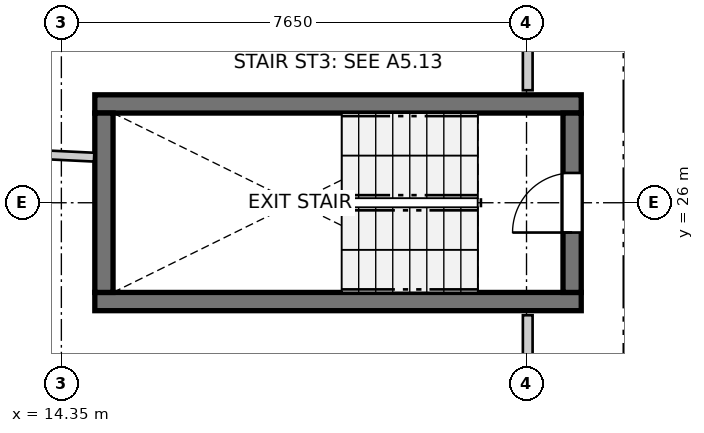
"""IFC4 building model, lengths in metres.
Left out: names, types, materials, properties, quantities, classifications, styles, units other than length and angle.
Written with IfcOpenShell. Run it as: python <this file> out.ifc"""

import sys

from ifc_helpers import new_model, si_unit, direction, frame, frame_2d, origin, place, context, subcontext, project, spatial, rectangle, extrude, source, transform, mapped, element, fill, save


model = new_model("IFC4")
c1 = context("Model", 3, precision=1e-05, world=origin(), true_north=direction((0.0, 1.0)))
c2 = subcontext(c1, "Body", "Model", "MODEL_VIEW")
j1 = project(units=[si_unit("LENGTHUNIT", "METRE"), si_unit("PLANEANGLEUNIT", "RADIAN")], contexts=[c1])
p1 = place(None, origin())
s1 = spatial("IfcSite", under=j1, at=p1, CompositionType="ELEMENT")
p2 = place(p1, origin())
s2 = spatial("IfcBuilding", under=s1, at=p2, CompositionType="ELEMENT")
p3 = place(p2, frame((0.0, 0.0, 36.6)))
s3 = spatial("IfcBuildingStorey", under=s2, at=p3, CompositionType="ELEMENT", Elevation=36.6)
for number, where, z_axis, x_axis in (
    (1, (14.9, 24.375, 0.0), (0.0, 0.0, 1.0), (1.0, 0.0, 0.0)),
    (2, (22.9, 27.625, 0.0), (0.0, 0.0, 1.0), (-1.0, 0.0, 0.0)),
):
    element("IfcWall", number, at=place(p3, frame(where, z_axis=z_axis, x_axis=x_axis)), inside=s3, PredefinedType="SHEAR", context=c2, shape_type="SweptSolid", body=[
        extrude(rectangle(XDim=8.0, YDim=0.3, at=frame_2d((4.0, 0.0))), origin(), (0.0, 0.0, 1.0), 2.94),
    ])
p4 = place(p3, frame((15.05, 27.475, 0.0), z_axis=(0.0, 0.0, 1.0), x_axis=(0.0, -1.0, 0.0)))
e3 = element("IfcWall", 3, at=p4, inside=s3, PredefinedType="SHEAR", context=c2, shape_type="SweptSolid", body=[
    extrude(rectangle(XDim=2.95, YDim=0.3, at=frame_2d((1.475, 0.0))), origin(), (0.0, 0.0, 1.0), 2.94),
])
p5 = place(p3, frame((22.75, 24.525, 0.0), z_axis=(0.0, 0.0, 1.0), x_axis=(0.0, 1.0, 0.0)))
e4 = element("IfcWall", 4, at=p5, inside=s3, PredefinedType="SHEAR", context=c2, shape_type="SweptSolid", body=[
    extrude(rectangle(XDim=2.95, YDim=0.3, at=frame_2d((1.475, 0.0))), origin(), (0.0, 0.0, 1.0), 2.94),
])
p6 = place(p5, frame((0.985, 0.0, 0.0)))
e5 = element("IfcOpeningElement", 5, at=p6, cuts=e4, PredefinedType="OPENING", context=c2, shape_type="SweptSolid", body=[
    extrude(rectangle(XDim=0.98, YDim=2.15, at=frame_2d((0.49, 1.075))), frame((0.0, 0.16, 0.0), z_axis=(0.0, -1.0, 0.0), x_axis=(1.0, 0.0, 0.0)), (0.0, 0.0, 1.0), 0.32),
])
p7 = place(p3, frame((22.02, 18.722, 0.0), z_axis=(0.0, 0.0, 1.0), x_axis=(0.0, 1.0, 0.0)))
e6 = element("IfcWall", 6, at=p7, inside=s3, PredefinedType="PARTITIONING", context=c2, shape_type="SweptSolid", body=[
    extrude(rectangle(XDim=5.428, YDim=0.16, at=frame_2d((2.714, 0.0))), origin(), (0.0, 0.0, 1.0), 2.94),
])
p8 = place(p7, frame((1.996, 0.0, 0.0)))
e7 = element("IfcOpeningElement", 7, at=p8, cuts=e6, PredefinedType="OPENING", context=c2, shape_type="SweptSolid", body=[
    extrude(rectangle(XDim=0.96, YDim=2.1, at=frame_2d((0.48, 1.05))), frame((0.0, 0.09, 0.0), z_axis=(0.0, -1.0, 0.0), x_axis=(1.0, 0.0, 0.0)), (0.0, 0.0, 1.0), 0.18),
])
p9 = place(p3, frame((22.02, 27.85, 0.0), z_axis=(0.0, 0.0, 1.0), x_axis=(0.0, 1.0, 0.0)))
e8 = element("IfcWall", 8, at=p9, inside=s3, PredefinedType="PARTITIONING", context=c2, shape_type="SweptSolid", body=[
    extrude(rectangle(XDim=3.569, YDim=0.16, at=frame_2d((1.784, 0.0))), origin(), (0.0, 0.0, 1.0), 2.94),
])
p10 = place(p9, frame((1.325, 0.0, 0.0)))
e9 = element("IfcOpeningElement", 9, at=p10, cuts=e8, PredefinedType="OPENING", context=c2, shape_type="SweptSolid", body=[
    extrude(rectangle(XDim=0.96, YDim=2.1, at=frame_2d((0.48, 1.05))), frame((0.0, 0.09, 0.0), z_axis=(0.0, -1.0, 0.0), x_axis=(1.0, 0.0, 0.0)), (0.0, 0.0, 1.0), 0.18),
])
p11 = place(p3, frame((3.765, 27.289, 0.0), z_axis=(0.0, 0.0, 1.0), x_axis=(0.998826748689, -0.048426502082, 0.0)))
e10 = element("IfcWall", 10, at=p11, inside=s3, PredefinedType="PARTITIONING", context=c2, shape_type="SweptSolid", body=[
    extrude(rectangle(XDim=11.137, YDim=0.145, at=frame_2d((5.568, 0.0))), origin(), (0.0, 0.0, 1.0), 2.94),
])
m1 = source(origin(), c2, "Body", "SweptSolid", [
    extrude(rectangle(XDim=0.98, YDim=2.15, at=frame_2d((0.49, 1.075))), frame((0.0, 0.025, 0.0), z_axis=(0.0, -1.0, 0.0), x_axis=(1.0, 0.0, 0.0)), (0.0, 0.0, 1.0), 0.05),
])
p12 = place(p6, origin())
e11 = element("IfcDoor", 11, at=p12, inside=s3, OperationType="SINGLE_SWING_LEFT", PredefinedType="DOOR", context=c2, shape_type="MappedRepresentation", body=[
    mapped(m1, transform((0.0, 0.0, 0.0), x_axis=(1.0, 0.0, 0.0), y_axis=(0.0, 1.0, 0.0), z_axis=(0.0, 0.0, 1.0), scale=1.0)),
])
fill(e5, e11)
save(model, sys.argv[1])
